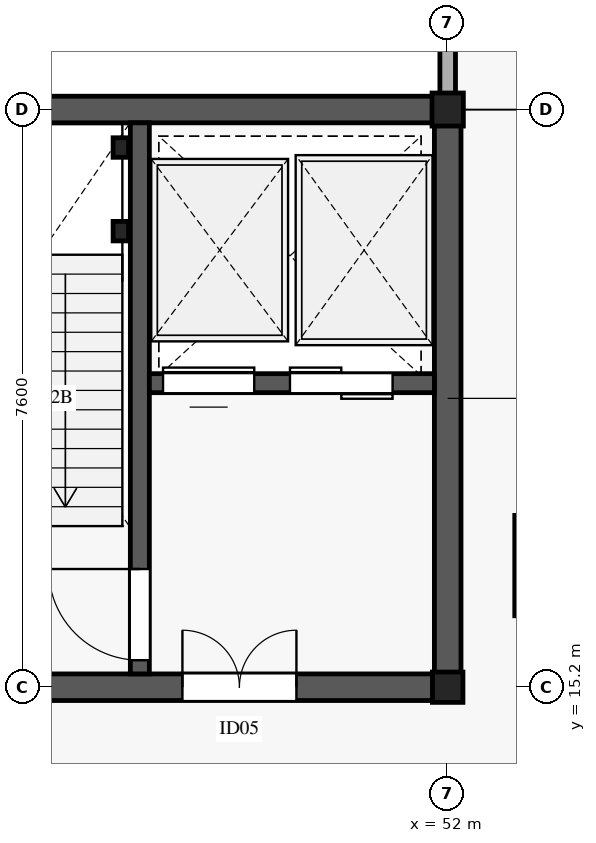
"""IFC4 building model, lengths in metres.
Left out: names, types, materials, properties, quantities, classifications, styles, units other than length and angle.
Written with IfcOpenShell. Run it as: python <this file> out.ifc"""

import sys

from ifc_helpers import new_model, si_unit, direction, frame, frame_2d, origin, origin_2d, place, context, subcontext, project, spatial, rectangle, i_section, extrude, element, fill, save


model = new_model("IFC4")
c1 = context("Model", 3, precision=1e-05, world=origin(), true_north=direction((0.0, 1.0)))
c2 = subcontext(c1, "Body", "Model", "MODEL_VIEW")
j1 = project(units=[si_unit("LENGTHUNIT", "METRE"), si_unit("PLANEANGLEUNIT", "RADIAN")], contexts=[c1])
p1 = place(None, origin())
s1 = spatial("IfcSite", under=j1, at=p1, CompositionType="ELEMENT")
p2 = place(p1, origin())
s2 = spatial("IfcBuilding", under=s1, at=p2, CompositionType="ELEMENT")
p3 = place(p2, frame((0.0, 0.0, 5.4)))
s3 = spatial("IfcBuildingStorey", under=s2, at=p3, CompositionType="ELEMENT", Elevation=5.4)
p4 = place(p3, frame((52.0, 15.2, 0.0), z_axis=(0.0, 0.0, 1.0), x_axis=(1.0, 0.0, 0.0)))
e1 = element("IfcColumn", 1, at=p4, inside=s3, PredefinedType="COLUMN", context=c2, shape_type="SweptSolid", body=[
    extrude(i_section(OverallWidth=0.401, OverallDepth=0.399, WebThickness=0.025, FlangeThickness=0.04, FilletRadius=0.015, at=origin_2d()), origin(), (0.0, 0.0, 1.0), 5.185),
])
p5 = place(p3, frame((52.0, 22.8, 0.0), z_axis=(0.0, 0.0, 1.0), x_axis=(1.0, 0.0, 0.0)))
e2 = element("IfcColumn", 2, at=p5, inside=s3, PredefinedType="COLUMN", context=c2, shape_type="SweptSolid", body=[
    extrude(i_section(OverallWidth=0.412, OverallDepth=0.435, WebThickness=0.036, FlangeThickness=0.057, FilletRadius=0.015, at=origin_2d()), origin(), (0.0, 0.0, 1.0), 5.185),
])
p6 = place(p3, frame((52.0, 22.98, 0.0), z_axis=(0.0, 0.0, 1.0), x_axis=(0.0, 1.0, 0.0)))
e3 = element("IfcWall", 3, at=p6, inside=s3, PredefinedType="STANDARD", context=c2, shape_type="SweptSolid", body=[
    extrude(rectangle(XDim=22.84, YDim=0.205, at=frame_2d((11.42, 0.0))), origin(), (0.0, 0.0, 1.0), 4.62),
])
p7 = place(p6, frame((10.195, 0.0, 0.85)))
e4 = element("IfcOpeningElement", 4, at=p7, cuts=e3, PredefinedType="OPENING", context=c2, shape_type="SweptSolid", body=[
    extrude(rectangle(XDim=2.45, YDim=1.55, at=frame_2d((1.225, 0.775))), frame((0.0, 0.113, 0.0), z_axis=(0.0, -1.0, 0.0), x_axis=(1.0, 0.0, 0.0)), (0.0, 0.0, 1.0), 0.225),
])
p8 = place(p3, frame((52.94, 17.46, 0.0), z_axis=(0.0, 0.0, 1.0), x_axis=(0.0, -1.0, 0.0)))
e5 = element("IfcWall", 5, at=p8, inside=s3, PredefinedType="PARTITIONING", context=c2, shape_type="SweptSolid", body=[
    extrude(rectangle(XDim=1.32, YDim=0.115, at=frame_2d((0.66, 0.0))), origin(), (0.0, 0.0, 1.0), 4.35),
])
p9 = place(p3, frame((43.825, 15.2, 0.0), z_axis=(0.0, 0.0, 1.0), x_axis=(1.0, 0.0, 0.0)))
e6 = element("IfcWall", 6, at=p9, inside=s3, PredefinedType="SHEAR", context=c2, shape_type="SweptSolid", body=[
    extrude(rectangle(XDim=8.35, YDim=0.35, at=frame_2d((4.175, 0.0))), origin(), (0.0, 0.0, 1.0), 5.19),
])
p10 = place(p9, frame((4.685, 0.0, 0.0)))
e7 = element("IfcOpeningElement", 7, at=p10, cuts=e6, PredefinedType="OPENING", context=c2, shape_type="SweptSolid", body=[
    extrude(rectangle(XDim=1.5, YDim=2.2, at=frame_2d((0.75, 1.1))), frame((0.0, 0.185, 0.0), z_axis=(0.0, -1.0, 0.0), x_axis=(1.0, 0.0, 0.0)), (0.0, 0.0, 1.0), 0.37),
])
p11 = place(p3, frame((43.825, 22.8, 0.0), z_axis=(0.0, 0.0, 1.0), x_axis=(1.0, 0.0, 0.0)))
e8 = element("IfcWall", 8, at=p11, inside=s3, PredefinedType="SHEAR", context=c2, shape_type="SweptSolid", body=[
    extrude(rectangle(XDim=8.35, YDim=0.35, at=frame_2d((4.175, 0.0))), origin(), (0.0, 0.0, 1.0), 5.19),
])
p12 = place(p3, frame((52.0, 15.375, 0.0), z_axis=(0.0, 0.0, 1.0), x_axis=(0.0, 1.0, 0.0)))
e9 = element("IfcWall", 9, at=p12, inside=s3, PredefinedType="SHEAR", context=c2, shape_type="SweptSolid", body=[
    extrude(rectangle(XDim=7.25, YDim=0.35, at=frame_2d((3.625, 0.0))), origin(), (0.0, 0.0, 1.0), 5.19),
])
p13 = place(p3, frame((47.95, 15.375, 0.0), z_axis=(0.0, 0.0, 1.0), x_axis=(0.0, 1.0, 0.0)))
e10 = element("IfcWall", 10, at=p13, inside=s3, PredefinedType="SHEAR", context=c2, shape_type="SweptSolid", body=[
    extrude(rectangle(XDim=7.25, YDim=0.25, at=frame_2d((3.625, 0.0))), origin(), (0.0, 0.0, 1.0), 5.19),
])
p14 = place(p13, frame((0.18, 0.0, 0.0)))
e11 = element("IfcOpeningElement", 11, at=p14, cuts=e10, PredefinedType="OPENING", context=c2, shape_type="SweptSolid", body=[
    extrude(rectangle(XDim=1.2, YDim=2.2, at=frame_2d((0.6, 1.1))), frame((0.0, 0.135, 0.0), z_axis=(0.0, -1.0, 0.0), x_axis=(1.0, 0.0, 0.0)), (0.0, 0.0, 1.0), 0.27),
])
p15 = place(p3, frame((48.075, 19.2, 0.0), z_axis=(0.0, 0.0, 1.0), x_axis=(1.0, 0.0, 0.0)))
e12 = element("IfcWall", 12, at=p15, inside=s3, PredefinedType="SHEAR", context=c2, shape_type="SweptSolid", body=[
    extrude(rectangle(XDim=3.75, YDim=0.25, at=frame_2d((1.875, 0.0))), origin(), (0.0, 0.0, 1.0), 5.19),
])
p16 = place(p15, frame((0.18, 0.0, 0.0)))
e13 = element("IfcOpeningElement", 13, at=p16, cuts=e12, PredefinedType="OPENING", context=c2, shape_type="SweptSolid", body=[
    extrude(rectangle(XDim=1.2, YDim=2.2, at=frame_2d((0.6, 1.1))), frame((0.0, 0.135, 0.0), z_axis=(0.0, -1.0, 0.0), x_axis=(1.0, 0.0, 0.0)), (0.0, 0.0, 1.0), 0.27),
])
p17 = place(p15, frame((1.85, 0.0, 0.0)))
e14 = element("IfcOpeningElement", 14, at=p17, cuts=e12, PredefinedType="OPENING", context=c2, shape_type="SweptSolid", body=[
    extrude(rectangle(XDim=1.35, YDim=2.2, at=frame_2d((0.675, 1.1))), frame((0.0, 0.135, 0.0), z_axis=(0.0, -1.0, 0.0), x_axis=(1.0, 0.0, 0.0)), (0.0, 0.0, 1.0), 0.27),
])
for number, where, z_axis, x_axis in (
    (15, (47.7, 21.2, 0.0), (0.0, 0.0, 1.0), (1.0, 0.0, 0.0)),
    (16, (47.7, 22.3, 0.0), (0.0, 0.0, 1.0), (1.0, 0.0, 0.0)),
):
    element("IfcColumn", number, at=place(p3, frame(where, z_axis=z_axis, x_axis=x_axis)), inside=s3, PredefinedType="COLUMN", context=c2, shape_type="SweptSolid", body=[
        extrude(i_section(OverallWidth=0.204, OverallDepth=0.257, WebThickness=0.009, FlangeThickness=0.016, FilletRadius=0.013, at=origin_2d()), origin(), (0.0, 0.0, 1.0), 5.395),
    ])
p18 = place(p14, origin())
e17 = element("IfcDoor", 17, at=p18, inside=s3, OperationType="SINGLE_SWING_RIGHT", PredefinedType="DOOR", context=c2, shape_type="SweptSolid", body=[
    extrude(rectangle(XDim=1.2, YDim=2.2, at=frame_2d((0.6, 1.1))), frame((0.0, 0.025, 0.0), z_axis=(0.0, -1.0, 0.0), x_axis=(1.0, 0.0, 0.0)), (0.0, 0.0, 1.0), 0.05),
])
fill(e11, e17)
p19 = place(p10, origin())
e18 = element("IfcDoor", 18, at=p19, inside=s3, OperationType="DOUBLE_DOOR_SINGLE_SWING", PredefinedType="DOOR", context=c2, shape_type="SweptSolid", body=[
    extrude(rectangle(XDim=1.5, YDim=2.2, at=frame_2d((0.75, 1.1))), frame((0.0, 0.025, 0.0), z_axis=(0.0, -1.0, 0.0), x_axis=(1.0, 0.0, 0.0)), (0.0, 0.0, 1.0), 0.05),
])
fill(e7, e18)
p20 = place(p16, origin())
e19 = element("IfcDoor", 19, at=p20, inside=s3, OperationType="SLIDING_TO_LEFT", PredefinedType="DOOR", context=c2, shape_type="SweptSolid", body=[
    extrude(rectangle(XDim=1.2, YDim=2.2, at=frame_2d((0.6, 1.1))), frame((0.0, 0.025, 0.0), z_axis=(0.0, -1.0, 0.0), x_axis=(1.0, 0.0, 0.0)), (0.0, 0.0, 1.0), 0.05),
])
fill(e13, e19)
p21 = place(p17, origin())
e20 = element("IfcDoor", 20, at=p21, inside=s3, OperationType="DOUBLE_DOOR_SLIDING", PredefinedType="DOOR", context=c2, shape_type="SweptSolid", body=[
    extrude(rectangle(XDim=1.35, YDim=2.2, at=frame_2d((0.675, 1.1))), frame((0.0, 0.025, 0.0), z_axis=(0.0, -1.0, 0.0), x_axis=(1.0, 0.0, 0.0)), (0.0, 0.0, 1.0), 0.05),
])
fill(e14, e20)
save(model, sys.argv[1])
